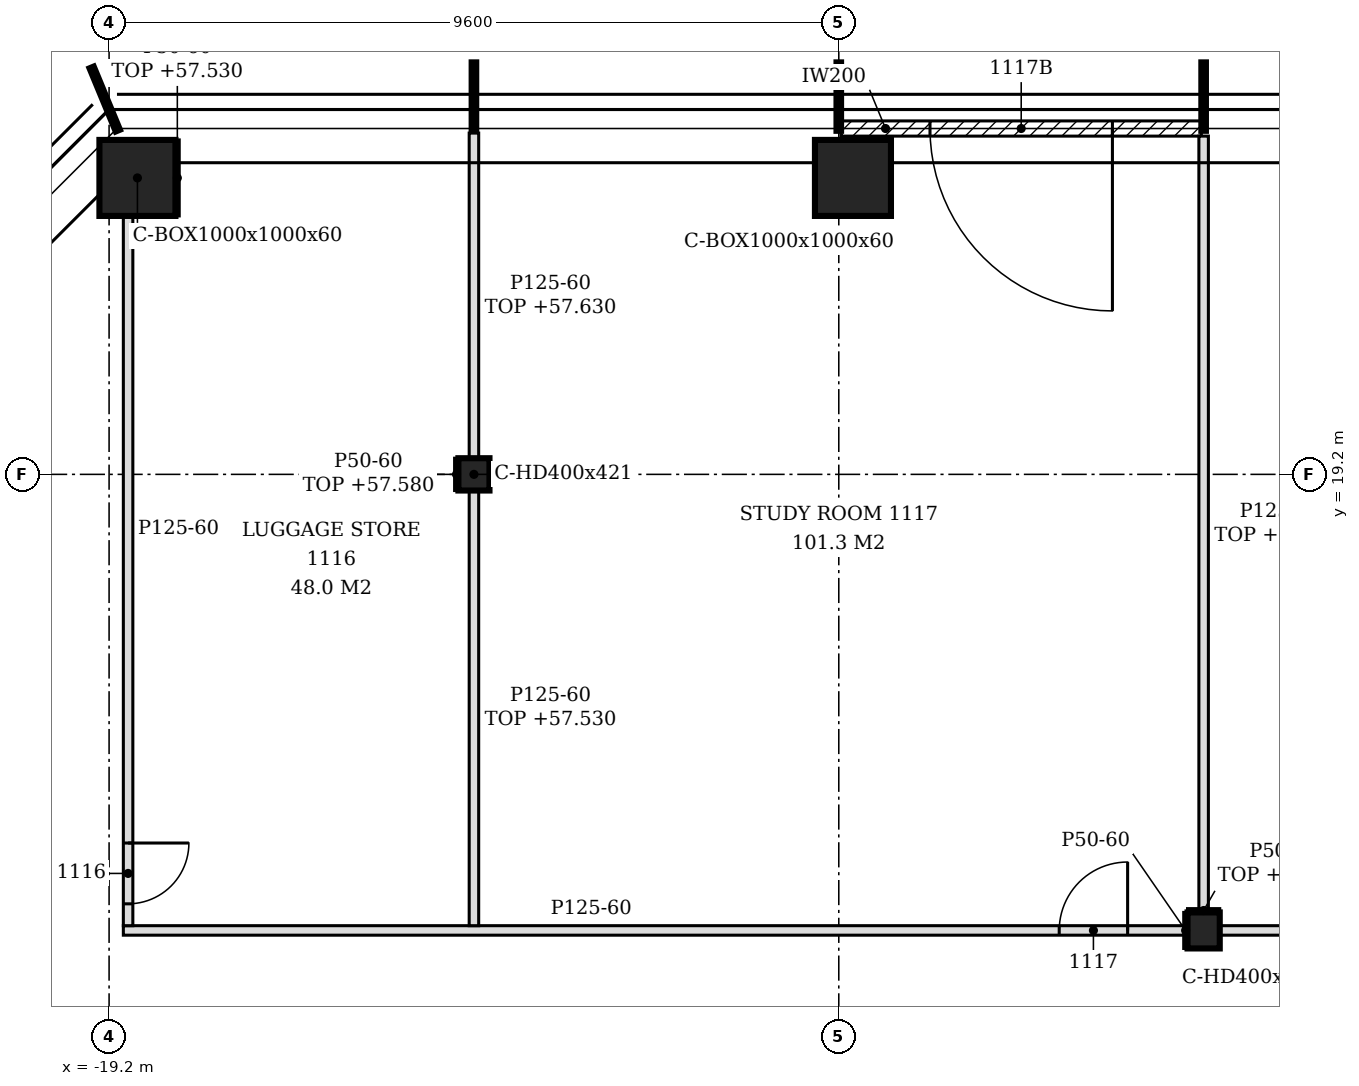
"""IFC4 building model, lengths in metres.
Left out: names, types, materials, properties, quantities, classifications, styles, units other than length and angle.
Written with IfcOpenShell. Run it as: python <this file> out.ifc"""

import sys

from ifc_helpers import new_model, si_unit, direction, frame, frame_2d, origin, origin_2d, place, context, subcontext, project, spatial, polyline, rectangle, hollow_rectangle, i_section, outline, extrude, element, fill, save


model = new_model("IFC4")
c1 = context("Model", 3, precision=1e-05, world=origin(), true_north=direction((0.0, 1.0)))
c2 = subcontext(c1, "Body", "Model", "MODEL_VIEW")
j1 = project(units=[si_unit("LENGTHUNIT", "METRE"), si_unit("PLANEANGLEUNIT", "RADIAN")], contexts=[c1])
p1 = place(None, origin())
s1 = spatial("IfcSite", under=j1, at=p1, CompositionType="ELEMENT")
p2 = place(p1, origin())
s2 = spatial("IfcBuilding", under=s1, at=p2, CompositionType="ELEMENT")
p3 = place(p2, frame((0.0, 0.0, 54.6)))
s3 = spatial("IfcBuildingStorey", under=s2, at=p3, CompositionType="ELEMENT", Elevation=54.6)
for number, where, z_axis, x_axis in (
    (1, (-9.414, 23.1, -0.15), (0.0, 0.0, 1.0), (1.0, 0.0, 0.0)),
    (2, (-18.827, 23.1, -0.15), (0.0, 0.0, 1.0), (1.0, 0.0, 0.0)),
):
    element("IfcColumn", number, at=place(p3, frame(where, z_axis=z_axis, x_axis=x_axis)), inside=s3, PredefinedType="COLUMN", context=c2, shape_type="SweptSolid", body=[
        extrude(hollow_rectangle(XDim=1.0, YDim=1.0, WallThickness=0.06, at=origin_2d()), origin(), (0.0, 0.0, 1.0), 3.6),
    ])
p4 = place(p3, frame((-4.8, 13.2, -0.15), z_axis=(0.0, 0.0, 1.0), x_axis=(1.0, 0.0, 0.0)))
e3 = element("IfcColumn", 3, at=p4, inside=s3, PredefinedType="COLUMN", context=c2, shape_type="SweptSolid", body=[
    extrude(i_section(OverallWidth=0.424, OverallDepth=0.474, WebThickness=0.048, FlangeThickness=0.077, FilletRadius=0.015, at=origin_2d()), origin(), (0.0, 0.0, 1.0), 3.6),
])
p5 = place(p3, frame((-14.4, 19.2, -0.15), z_axis=(0.0, 0.0, 1.0), x_axis=(1.0, 0.0, 0.0)))
e4 = element("IfcColumn", 4, at=p5, inside=s3, PredefinedType="COLUMN", context=c2, shape_type="SweptSolid", body=[
    extrude(i_section(OverallWidth=0.409, OverallDepth=0.425, WebThickness=0.033, FlangeThickness=0.052, FilletRadius=0.015, at=origin_2d()), origin(), (0.0, 0.0, 1.0), 3.6),
])
p6 = place(p3, frame((-4.83, 23.75, 0.0), z_axis=(0.0, 0.0, 1.0), x_axis=(-1.0, 0.0, 0.0)))
e5 = element("IfcWall", 5, at=p6, inside=s3, PredefinedType="NOTDEFINED", context=c2, shape_type="SweptSolid", body=[
    extrude(rectangle(XDim=4.74, YDim=0.2, at=frame_2d((2.37, 0.0))), origin(), (0.0, 0.0, 1.0), 3.45),
])
p7 = place(p6, frame((1.17, 0.0, 0.0)))
e6 = element("IfcOpeningElement", 6, at=p7, cuts=e5, PredefinedType="OPENING", context=c2, shape_type="SweptSolid", body=[
    extrude(rectangle(XDim=2.4, YDim=2.4, at=frame_2d((1.2, 1.2))), frame((0.0, 0.11, 0.0), z_axis=(0.0, -1.0, 0.0), x_axis=(1.0, 0.0, 0.0)), (0.0, 0.0, 1.0), 0.22),
])
p8 = place(p3, frame((-19.012, 13.2, 0.0), z_axis=(0.0, 0.0, 1.0), x_axis=(1.0, 0.0, 0.0)))
e7 = element("IfcWall", 7, at=p8, inside=s3, PredefinedType="PARTITIONING", context=c2, shape_type="SweptSolid", body=[
    extrude(outline(polyline([(0.0, 0.0), (14.0, 0.0), (14.0, 3.45), (4.762, 3.45), (4.76, 2.93), (4.462, 2.93), (4.46, 3.45), (0.0, 3.45), (0.0, 0.0)])), frame((0.0, 0.062, 0.0), z_axis=(0.0, -1.0, 0.0), x_axis=(1.0, 0.0, 0.0)), (0.0, 0.0, 1.0), 0.125),
])
p9 = place(p8, frame((12.312, 0.0, 0.0)))
e8 = element("IfcOpeningElement", 8, at=p9, cuts=e7, PredefinedType="OPENING", context=c2, shape_type="SweptSolid", body=[
    extrude(rectangle(XDim=0.9, YDim=2.1, at=frame_2d((0.45, 1.05))), frame((0.0, 0.073, 0.0), z_axis=(0.0, -1.0, 0.0), x_axis=(1.0, 0.0, 0.0)), (0.0, 0.0, 1.0), 0.145),
])
p10 = place(p3, frame((-4.588, 13.2, 0.0), z_axis=(0.0, 0.0, 1.0), x_axis=(1.0, 0.0, 0.0)))
e9 = element("IfcWall", 9, at=p10, inside=s3, PredefinedType="PARTITIONING", context=c2, shape_type="SweptSolid", body=[
    extrude(rectangle(XDim=11.576, YDim=0.125, at=frame_2d((5.788, 0.0))), origin(), (0.0, 0.0, 1.0), 2.83),
])
p11 = place(p10, frame((8.088, 0.0, 0.0)))
e10 = element("IfcOpeningElement", 10, at=p11, cuts=e9, PredefinedType="OPENING", context=c2, shape_type="SweptSolid", body=[
    extrude(rectangle(XDim=0.9, YDim=2.1, at=frame_2d((0.45, 1.05))), frame((0.0, 0.073, 0.0), z_axis=(0.0, -1.0, 0.0), x_axis=(1.0, 0.0, 0.0)), (0.0, 0.0, 1.0), 0.145),
])
p12 = place(p10, frame((9.888, 0.0, 0.0)))
e11 = element("IfcOpeningElement", 11, at=p12, cuts=e9, PredefinedType="OPENING", context=c2, shape_type="SweptSolid", body=[
    extrude(rectangle(XDim=0.9, YDim=2.1, at=frame_2d((0.45, 1.05))), frame((0.0, 0.073, 0.0), z_axis=(0.0, -1.0, 0.0), x_axis=(1.0, 0.0, 0.0)), (0.0, 0.0, 1.0), 0.145),
])
p13 = place(p3, frame((-18.95, 13.262, 0.0), z_axis=(0.0, 0.0, 1.0), x_axis=(0.0, 1.0, 0.0)))
e12 = element("IfcWall", 12, at=p13, inside=s3, PredefinedType="PARTITIONING", context=c2, shape_type="SweptSolid", body=[
    extrude(outline(polyline([(0.0, 0.0), (9.338, 0.0), (9.337, 2.63), (9.157, 2.63), (9.155, 3.45), (6.032, 3.45), (6.031, 2.98), (5.843, 2.98), (5.841, 3.45), (1.248, 3.45), (1.246, 2.83), (1.028, 2.83), (1.025, 3.45), (0.0, 3.45), (0.0, 0.0)])), frame((0.0, 0.062, 0.0), z_axis=(0.0, -1.0, 0.0), x_axis=(1.0, 0.0, 0.0)), (0.0, 0.0, 1.0), 0.125),
])
p14 = place(p13, frame((0.288, 0.0, 0.0)))
e13 = element("IfcOpeningElement", 13, at=p14, cuts=e12, PredefinedType="OPENING", context=c2, shape_type="SweptSolid", body=[
    extrude(rectangle(XDim=0.8, YDim=2.1, at=frame_2d((0.4, 1.05))), frame((0.0, 0.073, 0.0), z_axis=(0.0, -1.0, 0.0), x_axis=(1.0, 0.0, 0.0)), (0.0, 0.0, 1.0), 0.145),
])
p15 = place(p3, frame((-14.4, 13.262, 0.0), z_axis=(0.0, 0.0, 1.0), x_axis=(0.0, 1.0, 0.0)))
e14 = element("IfcWall", 14, at=p15, inside=s3, PredefinedType="PARTITIONING", context=c2, shape_type="SweptSolid", body=[
    extrude(rectangle(XDim=5.725, YDim=0.125, at=frame_2d((2.863, 0.0))), origin(), (0.0, 0.0, 1.0), 2.93),
])
p16 = place(p3, frame((-4.8, 13.437, 0.0), z_axis=(0.0, 0.0, 1.0), x_axis=(0.0, 1.0, 0.0)))
e15 = element("IfcWall", 15, at=p16, inside=s3, PredefinedType="PARTITIONING", context=c2, shape_type="SweptSolid", body=[
    extrude(rectangle(XDim=10.213, YDim=0.125, at=frame_2d((5.106, 0.0))), origin(), (0.0, 0.0, 1.0), 2.93),
])
p17 = place(p3, frame((-14.4, 19.413, 0.0), z_axis=(0.0, 0.0, 1.0), x_axis=(0.0, 1.0, 0.0)))
e16 = element("IfcWall", 16, at=p17, inside=s3, PredefinedType="PARTITIONING", context=c2, shape_type="SweptSolid", body=[
    extrude(outline(polyline([(0.0, 0.0), (4.277, 0.0), (4.278, 3.03), (3.837, 3.03), (3.835, 2.93), (3.538, 2.93), (3.535, 3.03), (0.0, 3.03), (0.0, 0.0)])), frame((0.0, 0.062, 0.0), z_axis=(0.0, -1.0, 0.0), x_axis=(1.0, 0.0, 0.0)), (0.0, 0.0, 1.0), 0.125),
])
p18 = place(p3, frame((-5.012, 13.462, 0.0), z_axis=(0.0, 0.0, 1.0), x_axis=(1.0, 0.0, 0.0)))
e17 = element("IfcWall", 17, at=p18, inside=s3, PredefinedType="PARTITIONING", context=c2, shape_type="SweptSolid", body=[
    extrude(rectangle(XDim=0.424, YDim=0.05, at=frame_2d((0.212, 0.0))), origin(), (0.0, 0.0, 1.0), 2.93),
])
p19 = place(p3, frame((-18.302, 22.6, 0.0), z_axis=(0.0, 0.0, 1.0), x_axis=(0.0, 1.0, 0.0)))
e18 = element("IfcWall", 18, at=p19, inside=s3, PredefinedType="PARTITIONING", context=c2, shape_type="SweptSolid", body=[
    extrude(rectangle(XDim=1.0, YDim=0.05, at=frame_2d((0.5, 0.0))), origin(), (0.0, 0.0, 1.0), 2.93),
])
p20 = place(p3, frame((-14.629, 18.988, 0.0), z_axis=(0.0, 0.0, 1.0), x_axis=(0.0, 1.0, 0.0)))
e19 = element("IfcWall", 19, at=p20, inside=s3, PredefinedType="PARTITIONING", context=c2, shape_type="SweptSolid", body=[
    extrude(rectangle(XDim=0.425, YDim=0.05, at=frame_2d((0.212, 0.0))), origin(), (0.0, 0.0, 1.0), 2.98),
])
p21 = place(p3, frame((-5.037, 12.963, 0.0), z_axis=(0.0, 0.0, 1.0), x_axis=(0.0, 1.0, 0.0)))
e20 = element("IfcWall", 20, at=p21, inside=s3, PredefinedType="PARTITIONING", context=c2, shape_type="SweptSolid", body=[
    extrude(rectangle(XDim=0.474, YDim=0.05, at=frame_2d((0.237, 0.0))), origin(), (0.0, 0.0, 1.0), 3.45),
])
p22 = place(p7, origin())
e21 = element("IfcDoor", 21, at=p22, inside=s3, OperationType="SINGLE_SWING_LEFT", PredefinedType="DOOR", context=c2, shape_type="SweptSolid", body=[
    extrude(rectangle(XDim=2.4, YDim=2.4, at=frame_2d((1.2, 1.2))), frame((0.0, 0.025, 0.0), z_axis=(0.0, -1.0, 0.0), x_axis=(1.0, 0.0, 0.0)), (0.0, 0.0, 1.0), 0.05),
])
fill(e6, e21)
p23 = place(p14, frame((0.8, 0.0, 0.0), z_axis=(0.0, 0.0, 1.0), x_axis=(-1.0, 0.0, 0.0)))
e22 = element("IfcDoor", 22, at=p23, inside=s3, OperationType="SINGLE_SWING_LEFT", PredefinedType="DOOR", context=c2, shape_type="SweptSolid", body=[
    extrude(rectangle(XDim=0.8, YDim=2.1, at=frame_2d((0.4, 1.05))), frame((0.0, 0.025, 0.0), z_axis=(0.0, -1.0, 0.0), x_axis=(1.0, 0.0, 0.0)), (0.0, 0.0, 1.0), 0.05),
])
fill(e13, e22)
p24 = place(p9, origin())
e23 = element("IfcDoor", 23, at=p24, inside=s3, OperationType="SINGLE_SWING_RIGHT", PredefinedType="DOOR", context=c2, shape_type="SweptSolid", body=[
    extrude(rectangle(XDim=0.9, YDim=2.1, at=frame_2d((0.45, 1.05))), frame((0.0, 0.025, 0.0), z_axis=(0.0, -1.0, 0.0), x_axis=(1.0, 0.0, 0.0)), (0.0, 0.0, 1.0), 0.05),
])
fill(e8, e23)
save(model, sys.argv[1])
